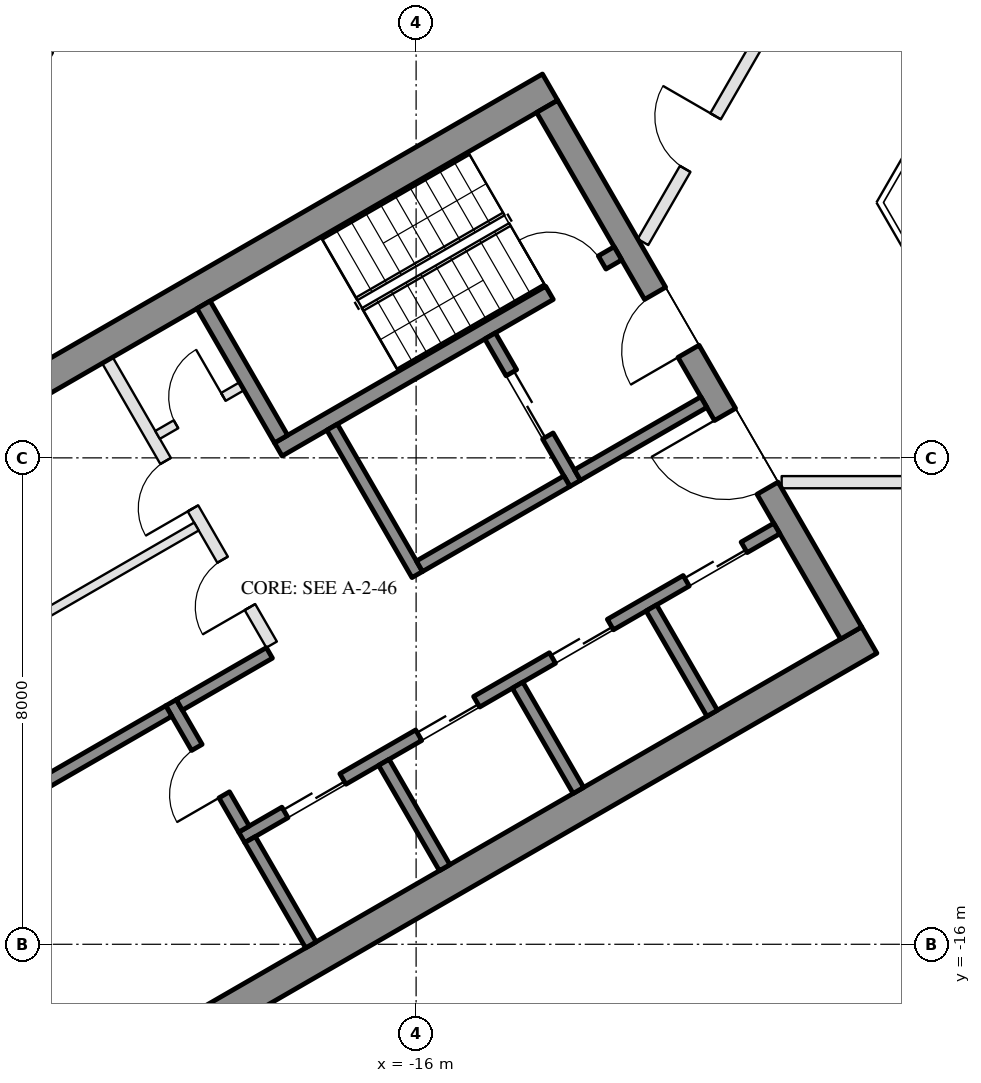
"""IFC4 building model, lengths in metres.
Left out: names, types, materials, properties, quantities, classifications, styles, units other than length and angle.
Written with IfcOpenShell. Run it as: python <this file> out.ifc"""

import sys

from ifc_helpers import new_model, si_unit, direction, frame, frame_2d, origin, place, context, subcontext, project, spatial, rectangle, extrude, element, fill, save


model = new_model("IFC4")
c1 = context("Model", 3, precision=1e-05, world=origin(), true_north=direction((0.0, 1.0)))
c2 = subcontext(c1, "Body", "Model", "MODEL_VIEW")
j1 = project(units=[si_unit("LENGTHUNIT", "METRE"), si_unit("PLANEANGLEUNIT", "RADIAN")], contexts=[c1])
p1 = place(None, origin())
s1 = spatial("IfcSite", under=j1, at=p1, CompositionType="ELEMENT")
p2 = place(p1, origin())
s2 = spatial("IfcBuilding", under=s1, at=p2, CompositionType="ELEMENT")
p3 = place(p2, frame((0.0, 0.0, 202.1)))
s3 = spatial("IfcBuildingStorey", under=s2, at=p3, CompositionType="ELEMENT", Elevation=202.1)
p4 = place(p3, frame((-20.309, 1.934, 0.0), z_axis=(0.0, 0.0, 1.0), x_axis=(-0.499992114976, -0.866029956157, 0.0)))
e1 = element("IfcWall", 1, at=p4, inside=s3, PredefinedType="SOLIDWALL", context=c2, shape_type="SweptSolid", body=[
    extrude(rectangle(XDim=6.74, YDim=0.35, at=frame_2d((3.37, 0.0))), origin(), (0.0, 0.0, 1.0), 3.55),
])
p5 = place(p4, frame((4.02, 0.0, 0.0)))
e2 = element("IfcOpeningElement", 2, at=p5, cuts=e1, PredefinedType="OPENING", context=c2, shape_type="SweptSolid", body=[
    extrude(rectangle(XDim=2.4, YDim=2.4, at=frame_2d((1.2, 1.2))), frame((0.0, 0.185, 0.0), z_axis=(0.0, -1.0, 0.0), x_axis=(1.0, 0.0, 0.0)), (0.0, 0.0, 1.0), 0.37),
])
p6 = place(p4, frame((0.77, 0.0, 0.3)))
e3 = element("IfcOpeningElement", 3, at=p6, cuts=e1, PredefinedType="OPENING", context=c2, shape_type="SweptSolid", body=[
    extrude(rectangle(XDim=2.9, YDim=2.65, at=frame_2d((1.45, 1.325))), frame((0.0, 0.185, 0.0), z_axis=(0.0, -1.0, 0.0), x_axis=(1.0, 0.0, 0.0)), (0.0, 0.0, 1.0), 0.37),
])
for number, where, z_axis, x_axis in (
    (4, (-13.797, -1.903, 0.0), (0.0, 0.0, 1.0), (-0.866, -0.5, 0.0)),
    (5, (-8.547, -10.997, 0.0), (0.0, 0.0, 1.0), (-0.866, -0.5, 0.0)),
):
    element("IfcWall", number, at=place(p3, frame(where, z_axis=z_axis, x_axis=x_axis)), inside=s3, PredefinedType="SHEAR", context=c2, shape_type="SweptSolid", body=[
        extrude(rectangle(XDim=14.837, YDim=0.5, at=frame_2d((7.418, 0.0))), origin(), (0.0, 0.0, 1.0), 3.5),
    ])
p7 = place(p3, frame((-13.845, -2.22, 0.0), z_axis=(0.0, 0.0, 1.0), x_axis=(0.500004234368, -0.866022959057, 0.0)))
e6 = element("IfcWall", 6, at=p7, inside=s3, PredefinedType="SHEAR", context=c2, shape_type="SweptSolid", body=[
    extrude(rectangle(XDim=10.0, YDim=0.4, at=frame_2d((5.0, 0.0))), origin(), (0.0, 0.0, 1.0), 3.5),
])
p8 = place(p7, frame((3.55, 0.0, 0.0)))
e7 = element("IfcOpeningElement", 7, at=p8, cuts=e6, PredefinedType="OPENING", context=c2, shape_type="SweptSolid", body=[
    extrude(rectangle(XDim=1.1, YDim=2.1, at=frame_2d((0.55, 1.05))), frame((0.0, 0.21, 0.0), z_axis=(0.0, -1.0, 0.0), x_axis=(1.0, 0.0, 0.0)), (0.0, 0.0, 1.0), 0.42),
])
p9 = place(p7, frame((5.85, 0.0, 0.0)))
e8 = element("IfcOpeningElement", 8, at=p9, cuts=e6, PredefinedType="OPENING", context=c2, shape_type="SweptSolid", body=[
    extrude(rectangle(XDim=1.4, YDim=2.1, at=frame_2d((0.7, 1.05))), frame((0.0, 0.21, 0.0), z_axis=(0.0, -1.0, 0.0), x_axis=(1.0, 0.0, 0.0)), (0.0, 0.0, 1.0), 0.42),
])
p10 = place(p3, frame((-12.681, -4.636, 0.0), z_axis=(0.0, 0.0, 1.0), x_axis=(-0.866021702275, -0.500006411147, 0.0)))
e9 = element("IfcWall", 9, at=p10, inside=s3, PredefinedType="SHEAR", context=c2, shape_type="SweptSolid", body=[
    extrude(rectangle(XDim=6.45, YDim=0.25, at=frame_2d((3.225, 0.0))), origin(), (0.0, 0.0, 1.0), 3.5),
])
p11 = place(p10, frame((0.3, 0.0, 0.0)))
e10 = element("IfcOpeningElement", 10, at=p11, cuts=e9, PredefinedType="OPENING", context=c2, shape_type="SweptSolid", body=[
    extrude(rectangle(XDim=1.0, YDim=2.1, at=frame_2d((0.5, 1.05))), frame((0.0, 0.135, 0.0), z_axis=(0.0, -1.0, 0.0), x_axis=(1.0, 0.0, 0.0)), (0.0, 0.0, 1.0), 0.27),
])
p12 = place(p3, frame((-19.496, -5.482, 0.0), z_axis=(0.0, 0.0, 1.0), x_axis=(0.499990435942, -0.866030925526, 0.0)))
e11 = element("IfcWall", 11, at=p12, inside=s3, PredefinedType="SHEAR", context=c2, shape_type="SweptSolid", body=[
    extrude(rectangle(XDim=2.55, YDim=0.25, at=frame_2d((1.275, 0.0))), origin(), (0.0, 0.0, 1.0), 3.5),
])
p13 = place(p3, frame((-17.381, -7.495, 0.0), z_axis=(0.0, 0.0, 1.0), x_axis=(0.500011755427, -0.866018616679, 0.0)))
e12 = element("IfcWall", 12, at=p13, inside=s3, PredefinedType="SHEAR", context=c2, shape_type="SweptSolid", body=[
    extrude(rectangle(XDim=2.8, YDim=0.2, at=frame_2d((1.4, 0.0))), origin(), (0.0, 0.0, 1.0), 3.5),
])
p14 = place(p3, frame((-14.783, -5.995, 0.0), z_axis=(0.0, 0.0, 1.0), x_axis=(0.49994636267, -0.866056369097, 0.0)))
e13 = element("IfcWall", 13, at=p14, inside=s3, PredefinedType="SHEAR", context=c2, shape_type="SweptSolid", body=[
    extrude(rectangle(XDim=2.8, YDim=0.2, at=frame_2d((1.4, 0.0))), origin(), (0.0, 0.0, 1.0), 3.5),
])
p15 = place(p14, frame((0.7, 0.0, 0.0)))
e14 = element("IfcOpeningElement", 14, at=p15, cuts=e13, PredefinedType="OPENING", context=c2, shape_type="SweptSolid", body=[
    extrude(rectangle(XDim=1.2, YDim=2.1, at=frame_2d((0.6, 1.05))), frame((0.0, 0.11, 0.0), z_axis=(0.0, -1.0, 0.0), x_axis=(1.0, 0.0, 0.0)), (0.0, 0.0, 1.0), 0.22),
])
p16 = place(p3, frame((-13.52, -8.383, 0.0), z_axis=(0.0, 0.0, 1.0), x_axis=(-0.866034573852, -0.49998411664, 0.0)))
e15 = element("IfcWall", 15, at=p16, inside=s3, PredefinedType="SHEAR", context=c2, shape_type="SweptSolid", body=[
    extrude(rectangle(XDim=2.8, YDim=0.2, at=frame_2d((1.4, 0.0))), origin(), (0.0, 0.0, 1.0), 3.5),
])
p17 = place(p3, frame((-11.268, -7.083, 0.0), z_axis=(0.0, 0.0, 1.0), x_axis=(-0.866050077142, -0.499957262057, 0.0)))
e16 = element("IfcWall", 16, at=p17, inside=s3, PredefinedType="SHEAR", context=c2, shape_type="SweptSolid", body=[
    extrude(rectangle(XDim=2.4, YDim=0.2, at=frame_2d((1.2, 0.0))), origin(), (0.0, 0.0, 1.0), 3.5),
])
p18 = place(p3, frame((-10.068, -9.162, 0.0), z_axis=(0.0, 0.0, 1.0), x_axis=(-0.866032725843, -0.499987317609, 0.0)))
e17 = element("IfcWall", 17, at=p18, inside=s3, PredefinedType="SHEAR", context=c2, shape_type="SweptSolid", body=[
    extrude(rectangle(XDim=10.16, YDim=0.2, at=frame_2d((5.08, 0.0))), origin(), (0.0, 0.0, 1.0), 3.5),
])
p19 = place(p18, frame((0.62, 0.0, 0.0)))
e18 = element("IfcOpeningElement", 18, at=p19, cuts=e17, PredefinedType="OPENING", context=c2, shape_type="SweptSolid", body=[
    extrude(rectangle(XDim=1.1, YDim=2.1, at=frame_2d((0.55, 1.05))), frame((0.0, 0.11, 0.0), z_axis=(0.0, -1.0, 0.0), x_axis=(1.0, 0.0, 0.0)), (0.0, 0.0, 1.0), 0.22),
])
p20 = place(p18, frame((3.16, 0.0, 0.0)))
e19 = element("IfcOpeningElement", 19, at=p20, cuts=e17, PredefinedType="OPENING", context=c2, shape_type="SweptSolid", body=[
    extrude(rectangle(XDim=1.1, YDim=2.1, at=frame_2d((0.55, 1.05))), frame((0.0, 0.11, 0.0), z_axis=(0.0, -1.0, 0.0), x_axis=(1.0, 0.0, 0.0)), (0.0, 0.0, 1.0), 0.22),
])
p21 = place(p18, frame((5.7, 0.0, 0.0)))
e20 = element("IfcOpeningElement", 20, at=p21, cuts=e17, PredefinedType="OPENING", context=c2, shape_type="SweptSolid", body=[
    extrude(rectangle(XDim=1.1, YDim=2.1, at=frame_2d((0.55, 1.05))), frame((0.0, 0.11, 0.0), z_axis=(0.0, -1.0, 0.0), x_axis=(1.0, 0.0, 0.0)), (0.0, 0.0, 1.0), 0.22),
])
p22 = place(p18, frame((8.24, 0.0, 0.0)))
e21 = element("IfcOpeningElement", 21, at=p22, cuts=e17, PredefinedType="OPENING", context=c2, shape_type="SweptSolid", body=[
    extrude(rectangle(XDim=1.1, YDim=2.1, at=frame_2d((0.55, 1.05))), frame((0.0, 0.11, 0.0), z_axis=(0.0, -1.0, 0.0), x_axis=(1.0, 0.0, 0.0)), (0.0, 0.0, 1.0), 0.22),
])
p23 = place(p3, frame((-20.031, -12.026, 0.0), z_axis=(0.0, 0.0, 1.0), x_axis=(0.500033551112, -0.866006032174, 0.0)))
e22 = element("IfcWall", 22, at=p23, inside=s3, PredefinedType="SHEAR", context=c2, shape_type="SweptSolid", body=[
    extrude(rectangle(XDim=2.4, YDim=0.2, at=frame_2d((1.2, 0.0))), origin(), (0.0, 0.0, 1.0), 3.5),
])
p24 = place(p23, frame((0.85, 0.0, 0.0)))
e23 = element("IfcOpeningElement", 23, at=p24, cuts=e22, PredefinedType="OPENING", context=c2, shape_type="SweptSolid", body=[
    extrude(rectangle(XDim=0.9, YDim=2.1, at=frame_2d((0.45, 1.05))), frame((0.0, 0.11, 0.0), z_axis=(0.0, -1.0, 0.0), x_axis=(1.0, 0.0, 0.0)), (0.0, 0.0, 1.0), 0.22),
])
p25 = place(p3, frame((-18.413, -11.208, 0.0), z_axis=(0.0, 0.0, 1.0), x_axis=(-0.866038183914, -0.499977863513, 0.0)))
e24 = element("IfcWall", 24, at=p25, inside=s3, PredefinedType="SHEAR", context=c2, shape_type="SweptSolid", body=[
    extrude(rectangle(XDim=1.71, YDim=0.2, at=frame_2d((0.855, 0.0))), origin(), (0.0, 0.0, 1.0), 3.5),
])
for number, where, z_axis, x_axis in (
    (25, (-12.131, -10.468, 0.0), (0.0, 0.0, 1.0), (0.5, -0.866, 0.0)),
    (26, (-14.331, -11.738, 0.0), (0.0, 0.0, 1.0), (0.5, -0.866, 0.0)),
    (27, (-16.531, -13.008, 0.0), (0.0, 0.0, 1.0), (0.5, -0.866, 0.0)),
    (28, (-18.73, -14.278, 0.0), (0.0, 0.0, 1.0), (0.5, -0.866, 0.0)),
):
    element("IfcWall", number, at=place(p3, frame(where, z_axis=z_axis, x_axis=x_axis)), inside=s3, PredefinedType="SHEAR", context=c2, shape_type="SweptSolid", body=[
        extrude(rectangle(XDim=2.0, YDim=0.2, at=frame_2d((1.0, 0.0))), origin(), (0.0, 0.0, 1.0), 3.5),
    ])
p26 = place(p3, frame((-20.067, -12.163, 0.0), z_axis=(0.0, 0.0, 1.0), x_axis=(-0.866055327414, -0.49994816717, 0.0)))
e29 = element("IfcWall", 29, at=p26, inside=s3, PredefinedType="SHEAR", context=c2, shape_type="SweptSolid", body=[
    extrude(rectangle(XDim=2.84, YDim=0.2, at=frame_2d((1.42, 0.0))), origin(), (0.0, 0.0, 1.0), 3.5),
])
p27 = place(p3, frame((-21.076, -6.395, 0.0), z_axis=(0.0, 0.0, 1.0), x_axis=(0.50001468107, -0.866016927499, 0.0)))
e30 = element("IfcWall", 30, at=p27, inside=s3, PredefinedType="PARTITIONING", context=c2, shape_type="SweptSolid", body=[
    extrude(rectangle(XDim=5.4, YDim=0.2, at=frame_2d((2.7, 0.0))), origin(), (0.0, 0.0, 1.0), 3.5),
])
p28 = place(p27, frame((1.913, 0.0, 0.0)))
e31 = element("IfcOpeningElement", 31, at=p28, cuts=e30, PredefinedType="OPENING", context=c2, shape_type="SweptSolid", body=[
    extrude(rectangle(XDim=0.9, YDim=2.1, at=frame_2d((0.45, 1.05))), frame((0.0, 0.11, 0.0), z_axis=(0.0, -1.0, 0.0), x_axis=(1.0, 0.0, 0.0)), (0.0, 0.0, 1.0), 0.22),
])
p29 = place(p27, frame((3.788, 0.0, 0.0)))
e32 = element("IfcOpeningElement", 32, at=p29, cuts=e30, PredefinedType="OPENING", context=c2, shape_type="SweptSolid", body=[
    extrude(rectangle(XDim=0.9, YDim=2.1, at=frame_2d((0.45, 1.05))), frame((0.0, 0.11, 0.0), z_axis=(0.0, -1.0, 0.0), x_axis=(1.0, 0.0, 0.0)), (0.0, 0.0, 1.0), 0.22),
])
p30 = place(p3, frame((-18.866, -6.822, 0.0), z_axis=(0.0, 0.0, 1.0), x_axis=(-0.866028054938, -0.499995408039, 0.0)))
e33 = element("IfcWall", 33, at=p30, inside=s3, PredefinedType="PARTITIONING", context=c2, shape_type="SweptSolid", body=[
    extrude(rectangle(XDim=1.6, YDim=0.15, at=frame_2d((0.8, 0.0))), origin(), (0.0, 0.0, 1.0), 3.5),
])
p31 = place(p30, frame((0.35, 0.0, 0.0)))
e34 = element("IfcOpeningElement", 34, at=p31, cuts=e33, PredefinedType="OPENING", context=c2, shape_type="SweptSolid", body=[
    extrude(rectangle(XDim=0.9, YDim=2.1, at=frame_2d((0.45, 1.05))), frame((0.0, 0.085, 0.0), z_axis=(0.0, -1.0, 0.0), x_axis=(1.0, 0.0, 0.0)), (0.0, 0.0, 1.0), 0.17),
])
p32 = place(p3, frame((-19.613, -9.13, 0.0), z_axis=(0.0, 0.0, 1.0), x_axis=(-0.866031734426, -0.499989034847, 0.0)))
e35 = element("IfcWall", 35, at=p32, inside=s3, PredefinedType="PARTITIONING", context=c2, shape_type="SweptSolid", body=[
    extrude(rectangle(XDim=6.95, YDim=0.15, at=frame_2d((3.475, 0.0))), origin(), (0.0, 0.0, 1.0), 3.5),
])
p33 = place(p3, frame((-3.807, -8.4, 0.0), z_axis=(0.0, 0.0, 1.0), x_axis=(-1.0, 0.0, 0.0)))
e36 = element("IfcWall", 36, at=p33, inside=s3, PredefinedType="PARTITIONING", context=c2, shape_type="SweptSolid", body=[
    extrude(rectangle(XDim=6.181, YDim=0.2, at=frame_2d((3.091, 0.0))), origin(), (0.0, 0.0, 1.0), 2.95),
])
p34 = place(p33, frame((2.591, 0.0, 0.0)))
e37 = element("IfcOpeningElement", 37, at=p34, cuts=e36, PredefinedType="OPENING", context=c2, shape_type="SweptSolid", body=[
    extrude(rectangle(XDim=1.0, YDim=2.1, at=frame_2d((0.5, 1.05))), frame((0.0, 0.11, 0.0), z_axis=(0.0, -1.0, 0.0), x_axis=(1.0, 0.0, 0.0)), (0.0, 0.0, 1.0), 0.22),
])
p35 = place(p3, frame((-12.269, -4.45, 0.0), z_axis=(0.0, 0.0, 1.0), x_axis=(0.500019063067, 0.866014397438, 0.0)))
e38 = element("IfcWall", 38, at=p35, inside=s3, PredefinedType="PARTITIONING", context=c2, shape_type="SweptSolid", body=[
    extrude(rectangle(XDim=3.776, YDim=0.2, at=frame_2d((1.888, 0.0))), origin(), (0.0, 0.0, 1.0), 2.95),
])
p36 = place(p35, frame((1.388, 0.0, 0.0)))
e39 = element("IfcOpeningElement", 39, at=p36, cuts=e38, PredefinedType="OPENING", context=c2, shape_type="SweptSolid", body=[
    extrude(rectangle(XDim=1.0, YDim=2.1, at=frame_2d((0.5, 1.05))), frame((0.0, 0.11, 0.0), z_axis=(0.0, -1.0, 0.0), x_axis=(1.0, 0.0, 0.0)), (0.0, 0.0, 1.0), 0.22),
])
p37 = place(p15, origin())
e40 = element("IfcDoor", 40, at=p37, inside=s3, OperationType="DOUBLE_DOOR_SLIDING", PredefinedType="DOOR", context=c2, shape_type="SweptSolid", body=[
    extrude(rectangle(XDim=1.2, YDim=2.1, at=frame_2d((0.6, 1.05))), frame((0.0, 0.025, 0.0), z_axis=(0.0, -1.0, 0.0), x_axis=(1.0, 0.0, 0.0)), (0.0, 0.0, 1.0), 0.05),
])
fill(e14, e40)
p38 = place(p31, frame((0.9, 0.0, 0.0), z_axis=(0.0, 0.0, 1.0), x_axis=(-1.0, 0.0, 0.0)))
e41 = element("IfcDoor", 41, at=p38, inside=s3, OperationType="SINGLE_SWING_RIGHT", PredefinedType="DOOR", context=c2, shape_type="SweptSolid", body=[
    extrude(rectangle(XDim=0.9, YDim=2.1, at=frame_2d((0.45, 1.05))), frame((0.0, 0.025, 0.0), z_axis=(0.0, -1.0, 0.0), x_axis=(1.0, 0.0, 0.0)), (0.0, 0.0, 1.0), 0.05),
])
fill(e34, e41)
p39 = place(p19, origin())
e42 = element("IfcDoor", 42, at=p39, inside=s3, OperationType="DOUBLE_DOOR_SLIDING", PredefinedType="DOOR", context=c2, shape_type="SweptSolid", body=[
    extrude(rectangle(XDim=1.1, YDim=2.1, at=frame_2d((0.55, 1.05))), frame((0.0, 0.025, 0.0), z_axis=(0.0, -1.0, 0.0), x_axis=(1.0, 0.0, 0.0)), (0.0, 0.0, 1.0), 0.05),
])
fill(e18, e42)
p40 = place(p20, origin())
e43 = element("IfcDoor", 43, at=p40, inside=s3, OperationType="DOUBLE_DOOR_SLIDING", PredefinedType="DOOR", context=c2, shape_type="SweptSolid", body=[
    extrude(rectangle(XDim=1.1, YDim=2.1, at=frame_2d((0.55, 1.05))), frame((0.0, 0.025, 0.0), z_axis=(0.0, -1.0, 0.0), x_axis=(1.0, 0.0, 0.0)), (0.0, 0.0, 1.0), 0.05),
])
fill(e19, e43)
p41 = place(p21, origin())
e44 = element("IfcDoor", 44, at=p41, inside=s3, OperationType="DOUBLE_DOOR_SLIDING", PredefinedType="DOOR", context=c2, shape_type="SweptSolid", body=[
    extrude(rectangle(XDim=1.1, YDim=2.1, at=frame_2d((0.55, 1.05))), frame((0.0, 0.025, 0.0), z_axis=(0.0, -1.0, 0.0), x_axis=(1.0, 0.0, 0.0)), (0.0, 0.0, 1.0), 0.05),
])
fill(e20, e44)
p42 = place(p22, origin())
e45 = element("IfcDoor", 45, at=p42, inside=s3, OperationType="DOUBLE_DOOR_SLIDING", PredefinedType="DOOR", context=c2, shape_type="SweptSolid", body=[
    extrude(rectangle(XDim=1.1, YDim=2.1, at=frame_2d((0.55, 1.05))), frame((0.0, 0.025, 0.0), z_axis=(0.0, -1.0, 0.0), x_axis=(1.0, 0.0, 0.0)), (0.0, 0.0, 1.0), 0.05),
])
fill(e21, e45)
p43 = place(p24, frame((0.9, 0.0, 0.0), z_axis=(0.0, 0.0, 1.0), x_axis=(-1.0, 0.0, 0.0)))
e46 = element("IfcDoor", 46, at=p43, inside=s3, OperationType="SINGLE_SWING_LEFT", PredefinedType="DOOR", context=c2, shape_type="SweptSolid", body=[
    extrude(rectangle(XDim=0.9, YDim=2.1, at=frame_2d((0.45, 1.05))), frame((0.0, 0.025, 0.0), z_axis=(0.0, -1.0, 0.0), x_axis=(1.0, 0.0, 0.0)), (0.0, 0.0, 1.0), 0.05),
])
fill(e23, e46)
p44 = place(p28, frame((0.9, 0.0, 0.0), z_axis=(0.0, 0.0, 1.0), x_axis=(-1.0, 0.0, 0.0)))
e47 = element("IfcDoor", 47, at=p44, inside=s3, OperationType="SINGLE_SWING_LEFT", PredefinedType="DOOR", context=c2, shape_type="SweptSolid", body=[
    extrude(rectangle(XDim=0.9, YDim=2.1, at=frame_2d((0.45, 1.05))), frame((0.0, 0.025, 0.0), z_axis=(0.0, -1.0, 0.0), x_axis=(1.0, 0.0, 0.0)), (0.0, 0.0, 1.0), 0.05),
])
fill(e31, e47)
p45 = place(p29, frame((0.9, 0.0, 0.0), z_axis=(0.0, 0.0, 1.0), x_axis=(-1.0, 0.0, 0.0)))
e48 = element("IfcDoor", 48, at=p45, inside=s3, OperationType="SINGLE_SWING_LEFT", PredefinedType="DOOR", context=c2, shape_type="SweptSolid", body=[
    extrude(rectangle(XDim=0.9, YDim=2.1, at=frame_2d((0.45, 1.05))), frame((0.0, 0.025, 0.0), z_axis=(0.0, -1.0, 0.0), x_axis=(1.0, 0.0, 0.0)), (0.0, 0.0, 1.0), 0.05),
])
fill(e32, e48)
p46 = place(p8, frame((1.1, 0.0, 0.0), z_axis=(0.0, 0.0, 1.0), x_axis=(-1.0, 0.0, 0.0)))
e49 = element("IfcDoor", 49, at=p46, inside=s3, OperationType="SINGLE_SWING_LEFT", PredefinedType="DOOR", context=c2, shape_type="SweptSolid", body=[
    extrude(rectangle(XDim=1.1, YDim=2.1, at=frame_2d((0.55, 1.05))), frame((0.0, 0.025, 0.0), z_axis=(0.0, -1.0, 0.0), x_axis=(1.0, 0.0, 0.0)), (0.0, 0.0, 1.0), 0.05),
])
fill(e7, e49)
p47 = place(p9, frame((1.4, 0.0, 0.0), z_axis=(0.0, 0.0, 1.0), x_axis=(-1.0, 0.0, 0.0)))
e50 = element("IfcDoor", 50, at=p47, inside=s3, OperationType="DOUBLE_DOOR_SINGLE_SWING", PredefinedType="DOOR", context=c2, shape_type="SweptSolid", body=[
    extrude(rectangle(XDim=1.4, YDim=2.1, at=frame_2d((0.7, 1.05))), frame((0.0, 0.025, 0.0), z_axis=(0.0, -1.0, 0.0), x_axis=(1.0, 0.0, 0.0)), (0.0, 0.0, 1.0), 0.05),
])
fill(e8, e50)
p48 = place(p11, frame((1.0, 0.0, 0.0), z_axis=(0.0, 0.0, 1.0), x_axis=(-1.0, 0.0, 0.0)))
e51 = element("IfcDoor", 51, at=p48, inside=s3, OperationType="SINGLE_SWING_LEFT", PredefinedType="DOOR", context=c2, shape_type="SweptSolid", body=[
    extrude(rectangle(XDim=1.0, YDim=2.1, at=frame_2d((0.5, 1.05))), frame((0.0, 0.025, 0.0), z_axis=(0.0, -1.0, 0.0), x_axis=(1.0, 0.0, 0.0)), (0.0, 0.0, 1.0), 0.05),
])
fill(e10, e51)
p49 = place(p36, origin())
e52 = element("IfcDoor", 52, at=p49, inside=s3, OperationType="SINGLE_SWING_RIGHT", PredefinedType="DOOR", context=c2, shape_type="SweptSolid", body=[
    extrude(rectangle(XDim=1.0, YDim=2.1, at=frame_2d((0.5, 1.05))), frame((0.0, 0.025, 0.0), z_axis=(0.0, -1.0, 0.0), x_axis=(1.0, 0.0, 0.0)), (0.0, 0.0, 1.0), 0.05),
])
fill(e39, e52)
save(model, sys.argv[1])
